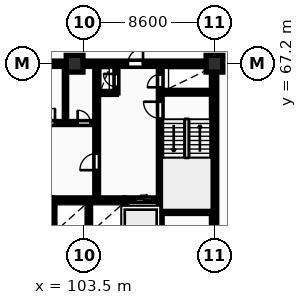
"""IFC4 building model, lengths in metres.
Left out: names, types, materials, properties, quantities, classifications, styles, units other than length and angle.
Written with IfcOpenShell. Run it as: python <this file> out.ifc"""

import sys

from ifc_helpers import new_model, si_unit, direction, frame, frame_2d, origin, origin_2d, place, context, subcontext, project, spatial, rectangle, extrude, element, fill, save


model = new_model("IFC4")
c1 = context("Model", 3, precision=1e-05, world=origin(), true_north=direction((0.0, 1.0)))
c2 = subcontext(c1, "Body", "Model", "MODEL_VIEW")
j1 = project(units=[si_unit("LENGTHUNIT", "METRE"), si_unit("PLANEANGLEUNIT", "RADIAN")], contexts=[c1])
p1 = place(None, origin())
s1 = spatial("IfcSite", under=j1, at=p1, CompositionType="ELEMENT")
p2 = place(p1, origin())
s2 = spatial("IfcBuilding", under=s1, at=p2, CompositionType="ELEMENT")
p3 = place(p2, frame((0.0, 0.0, -7.2)))
s3 = spatial("IfcBuildingStorey", under=s2, at=p3, CompositionType="ELEMENT", Elevation=-7.2)
for number, where, z_axis, x_axis in (
    (1, (102.9, 67.2, 0.0), (0.0, 0.0, 1.0), (1.0, 0.0, 0.0)),
    (2, (112.1, 67.2, 0.0), (0.0, 0.0, 1.0), (1.0, 0.0, 0.0)),
):
    element("IfcColumn", number, at=place(p3, frame(where, z_axis=z_axis, x_axis=x_axis)), inside=s3, PredefinedType="COLUMN", context=c2, shape_type="SweptSolid", body=[
        extrude(rectangle(XDim=1.1, YDim=1.1, at=origin_2d()), origin(), (0.0, 0.0, 1.0), 3.6),
    ])
p4 = place(p3, frame((112.075, 55.375, 0.0), z_axis=(0.0, 0.0, 1.0), x_axis=(0.0, 1.0, 0.0)))
e3 = element("IfcWall", 3, at=p4, inside=s3, PredefinedType="SHEAR", context=c2, shape_type="SweptSolid", body=[
    extrude(rectangle(XDim=11.65, YDim=0.35, at=frame_2d((5.825, 0.0))), origin(), (0.0, 0.0, 1.0), 3.6),
])
p5 = place(p3, frame((75.95, 67.2, 0.0), z_axis=(0.0, 0.0, 1.0), x_axis=(1.0, 0.0, 0.0)))
e4 = element("IfcWall", 4, at=p5, inside=s3, PredefinedType="SHEAR", context=c2, shape_type="SweptSolid", body=[
    extrude(rectangle(XDim=36.3, YDim=0.35, at=frame_2d((18.15, 0.0))), origin(), (0.0, 0.0, 1.0), 3.6),
])
p6 = place(p5, frame((5.25, 0.0, 0.0)))
e5 = element("IfcOpeningElement", 5, at=p6, cuts=e4, PredefinedType="OPENING", context=c2, shape_type="SweptSolid", body=[
    extrude(rectangle(XDim=1.0, YDim=2.15, at=frame_2d((0.5, 1.075))), frame((0.0, 0.185, 0.0), z_axis=(0.0, -1.0, 0.0), x_axis=(1.0, 0.0, 0.0)), (0.0, 0.0, 1.0), 0.37),
])
p7 = place(p5, frame((21.6, 0.0, 0.0)))
e6 = element("IfcOpeningElement", 6, at=p7, cuts=e4, PredefinedType="OPENING", context=c2, shape_type="SweptSolid", body=[
    extrude(rectangle(XDim=1.5, YDim=2.2, at=frame_2d((0.75, 1.1))), frame((0.0, 0.185, 0.0), z_axis=(0.0, -1.0, 0.0), x_axis=(1.0, 0.0, 0.0)), (0.0, 0.0, 1.0), 0.37),
])
p8 = place(p5, frame((30.45, 0.0, 0.0)))
e7 = element("IfcOpeningElement", 7, at=p8, cuts=e4, PredefinedType="OPENING", context=c2, shape_type="SweptSolid", body=[
    extrude(rectangle(XDim=1.0, YDim=2.15, at=frame_2d((0.5, 1.075))), frame((0.0, 0.185, 0.0), z_axis=(0.0, -1.0, 0.0), x_axis=(1.0, 0.0, 0.0)), (0.0, 0.0, 1.0), 0.37),
])
p9 = place(p3, frame((101.48, 55.4, 0.0), z_axis=(0.0, 0.0, 1.0), x_axis=(0.0, 1.0, 0.0)))
e8 = element("IfcWall", 8, at=p9, inside=s3, PredefinedType="SHEAR", context=c2, shape_type="SweptSolid", body=[
    extrude(rectangle(XDim=2.85, YDim=0.25, at=frame_2d((1.425, 0.0))), origin(), (0.0, 0.0, 1.0), 3.6),
])
p10 = place(p3, frame((103.85, 55.4, 0.0), z_axis=(0.0, 0.0, 1.0), x_axis=(0.0, 1.0, 0.0)))
e9 = element("IfcWall", 9, at=p10, inside=s3, PredefinedType="PARTITIONING", context=c2, shape_type="SweptSolid", body=[
    extrude(rectangle(XDim=2.72, YDim=0.2, at=frame_2d((1.36, 0.0))), origin(), (0.0, 0.0, 1.0), 3.3),
])
p11 = place(p3, frame((101.55, 58.25, 0.0), z_axis=(0.0, 0.0, 1.0), x_axis=(1.0, 0.0, 0.0)))
e10 = element("IfcWall", 10, at=p11, inside=s3, PredefinedType="SHEAR", context=c2, shape_type="SweptSolid", body=[
    extrude(rectangle(XDim=4.6, YDim=0.25, at=frame_2d((2.3, 0.0))), origin(), (0.0, 0.0, 1.0), 3.6),
])
p12 = place(p3, frame((106.22, 55.4, 0.0), z_axis=(0.0, 0.0, 1.0), x_axis=(0.0, 1.0, 0.0)))
e11 = element("IfcWall", 11, at=p12, inside=s3, PredefinedType="SHEAR", context=c2, shape_type="SweptSolid", body=[
    extrude(rectangle(XDim=2.85, YDim=0.25, at=frame_2d((1.425, 0.0))), origin(), (0.0, 0.0, 1.0), 3.6),
])
p13 = place(p3, frame((106.22, 58.25, 0.0), z_axis=(0.0, 0.0, 1.0), x_axis=(1.0, 0.0, 0.0)))
e12 = element("IfcWall", 12, at=p13, inside=s3, PredefinedType="SHEAR", context=c2, shape_type="SweptSolid", body=[
    extrude(rectangle(XDim=2.46, YDim=0.25, at=frame_2d((1.23, 0.0))), origin(), (0.0, 0.0, 1.0), 3.6),
])
p14 = place(p13, frame((0.67, 0.0, 0.0)))
e13 = element("IfcOpeningElement", 13, at=p14, cuts=e12, PredefinedType="OPENING", context=c2, shape_type="SweptSolid", body=[
    extrude(rectangle(XDim=1.12, YDim=2.12, at=frame_2d((0.56, 1.06))), frame((0.0, 0.135, 0.0), z_axis=(0.0, -1.0, 0.0), x_axis=(1.0, 0.0, 0.0)), (0.0, 0.0, 1.0), 0.27),
])
p15 = place(p3, frame((102.3, 63.4, 0.0), z_axis=(0.0, 0.0, 1.0), x_axis=(0.0, 1.0, 0.0)))
e14 = element("IfcWall", 14, at=p15, inside=s3, PredefinedType="PARTITIONING", context=c2, shape_type="SweptSolid", body=[
    extrude(rectangle(XDim=3.6, YDim=0.15, at=frame_2d((1.8, 0.0))), origin(), (0.0, 0.0, 1.0), 3.3),
])
p16 = place(p3, frame((84.42, 63.3, 0.0), z_axis=(0.0, 0.0, 1.0), x_axis=(1.0, 0.0, 0.0)))
e15 = element("IfcWall", 15, at=p16, inside=s3, PredefinedType="PARTITIONING", context=c2, shape_type="SweptSolid", body=[
    extrude(rectangle(XDim=19.83, YDim=0.2, at=frame_2d((9.915, 0.0))), origin(), (0.0, 0.0, 1.0), 3.3),
])
p17 = place(p16, frame((1.15, 0.0, 0.0)))
e16 = element("IfcOpeningElement", 16, at=p17, cuts=e15, PredefinedType="OPENING", context=c2, shape_type="SweptSolid", body=[
    extrude(rectangle(XDim=0.85, YDim=2.05, at=frame_2d((0.425, 1.025))), frame((0.0, 0.11, 0.0), z_axis=(0.0, -1.0, 0.0), x_axis=(1.0, 0.0, 0.0)), (0.0, 0.0, 1.0), 0.22),
])
p18 = place(p16, frame((3.25, 0.0, 0.0)))
e17 = element("IfcOpeningElement", 17, at=p18, cuts=e15, PredefinedType="OPENING", context=c2, shape_type="SweptSolid", body=[
    extrude(rectangle(XDim=0.85, YDim=2.05, at=frame_2d((0.425, 1.025))), frame((0.0, 0.11, 0.0), z_axis=(0.0, -1.0, 0.0), x_axis=(1.0, 0.0, 0.0)), (0.0, 0.0, 1.0), 0.22),
])
p19 = place(p16, frame((13.08, 0.0, 0.0)))
e18 = element("IfcOpeningElement", 18, at=p19, cuts=e15, PredefinedType="OPENING", context=c2, shape_type="SweptSolid", body=[
    extrude(rectangle(XDim=1.5, YDim=2.2, at=frame_2d((0.75, 1.1))), frame((0.0, 0.11, 0.0), z_axis=(0.0, -1.0, 0.0), x_axis=(1.0, 0.0, 0.0)), (0.0, 0.0, 1.0), 0.22),
])
p20 = place(p16, frame((5.53, 0.0, 0.0)))
e19 = element("IfcOpeningElement", 19, at=p20, cuts=e15, PredefinedType="OPENING", context=c2, shape_type="SweptSolid", body=[
    extrude(rectangle(XDim=0.88, YDim=2.06, at=frame_2d((0.44, 1.03))), frame((0.0, 0.11, 0.0), z_axis=(0.0, -1.0, 0.0), x_axis=(1.0, 0.0, 0.0)), (0.0, 0.0, 1.0), 0.22),
])
p21 = place(p16, frame((7.68, 0.0, 0.0)))
e20 = element("IfcOpeningElement", 20, at=p21, cuts=e15, PredefinedType="OPENING", context=c2, shape_type="SweptSolid", body=[
    extrude(rectangle(XDim=0.88, YDim=2.06, at=frame_2d((0.44, 1.03))), frame((0.0, 0.11, 0.0), z_axis=(0.0, -1.0, 0.0), x_axis=(1.0, 0.0, 0.0)), (0.0, 0.0, 1.0), 0.22),
])
p22 = place(p16, frame((10.43, 0.0, 0.0)))
e21 = element("IfcOpeningElement", 21, at=p22, cuts=e15, PredefinedType="OPENING", context=c2, shape_type="SweptSolid", body=[
    extrude(rectangle(XDim=0.85, YDim=2.05, at=frame_2d((0.425, 1.025))), frame((0.0, 0.11, 0.0), z_axis=(0.0, -1.0, 0.0), x_axis=(1.0, 0.0, 0.0)), (0.0, 0.0, 1.0), 0.22),
])
p23 = place(p16, frame((16.23, 0.0, 0.0)))
e22 = element("IfcOpeningElement", 22, at=p23, cuts=e15, PredefinedType="OPENING", context=c2, shape_type="SweptSolid", body=[
    extrude(rectangle(XDim=0.96, YDim=2.1, at=frame_2d((0.48, 1.05))), frame((0.0, 0.11, 0.0), z_axis=(0.0, -1.0, 0.0), x_axis=(1.0, 0.0, 0.0)), (0.0, 0.0, 1.0), 0.22),
])
p24 = place(p16, frame((18.68, 0.0, 0.0)))
e23 = element("IfcOpeningElement", 23, at=p24, cuts=e15, PredefinedType="OPENING", context=c2, shape_type="SweptSolid", body=[
    extrude(rectangle(XDim=0.84, YDim=2.04, at=frame_2d((0.42, 1.02))), frame((0.0, 0.11, 0.0), z_axis=(0.0, -1.0, 0.0), x_axis=(1.0, 0.0, 0.0)), (0.0, 0.0, 1.0), 0.22),
])
p25 = place(p3, frame((104.45, 65.28, 0.0), z_axis=(0.0, 0.0, 1.0), x_axis=(1.0, 0.0, 0.0)))
e24 = element("IfcWall", 24, at=p25, inside=s3, PredefinedType="PARTITIONING", context=c2, shape_type="SweptSolid", body=[
    extrude(rectangle(XDim=1.2, YDim=0.2, at=frame_2d((0.6, 0.0))), origin(), (0.0, 0.0, 1.0), 3.3),
])
p26 = place(p3, frame((105.65, 65.28, 0.0), z_axis=(0.0, 0.0, 1.0), x_axis=(0.0, 1.0, 0.0)))
e25 = element("IfcWall", 25, at=p26, inside=s3, PredefinedType="PARTITIONING", context=c2, shape_type="SweptSolid", body=[
    extrude(rectangle(XDim=1.72, YDim=0.2, at=frame_2d((0.86, 0.0))), origin(), (0.0, 0.0, 1.0), 3.3),
])
p27 = place(p26, frame((0.4, 0.0, 0.0)))
e26 = element("IfcOpeningElement", 26, at=p27, cuts=e25, PredefinedType="OPENING", context=c2, shape_type="SweptSolid", body=[
    extrude(rectangle(XDim=0.85, YDim=2.05, at=frame_2d((0.425, 1.025))), frame((0.0, 0.11, 0.0), z_axis=(0.0, -1.0, 0.0), x_axis=(1.0, 0.0, 0.0)), (0.0, 0.0, 1.0), 0.22),
])
p28 = place(p3, frame((104.35, 58.4, 0.0), z_axis=(0.0, 0.0, 1.0), x_axis=(0.0, 1.0, 0.0)))
e27 = element("IfcWall", 27, at=p28, inside=s3, PredefinedType="SHEAR", context=c2, shape_type="SweptSolid", body=[
    extrude(rectangle(XDim=8.6, YDim=0.25, at=frame_2d((4.3, 0.0))), origin(), (0.0, 0.0, 1.0), 3.6),
])
p29 = place(p28, frame((1.8, 0.0, 0.0)))
e28 = element("IfcOpeningElement", 28, at=p29, cuts=e27, PredefinedType="OPENING", context=c2, shape_type="SweptSolid", body=[
    extrude(rectangle(XDim=1.1, YDim=2.1, at=frame_2d((0.55, 1.05))), frame((0.0, 0.135, 0.0), z_axis=(0.0, -1.0, 0.0), x_axis=(1.0, 0.0, 0.0)), (0.0, 0.0, 1.0), 0.27),
])
p30 = place(p3, frame((108.535, 55.4, 0.0), z_axis=(0.0, 0.0, 1.0), x_axis=(0.0, 1.0, 0.0)))
e29 = element("IfcWall", 29, at=p30, inside=s3, PredefinedType="SHEAR", context=c2, shape_type="SweptSolid", body=[
    extrude(rectangle(XDim=11.6, YDim=0.25, at=frame_2d((5.8, 0.0))), origin(), (0.0, 0.0, 1.0), 3.6),
])
p31 = place(p30, frame((8.2, 0.0, 0.0)))
e30 = element("IfcOpeningElement", 30, at=p31, cuts=e29, PredefinedType="OPENING", context=c2, shape_type="SweptSolid", body=[
    extrude(rectangle(XDim=1.1, YDim=2.1, at=frame_2d((0.55, 1.05))), frame((0.0, 0.135, 0.0), z_axis=(0.0, -1.0, 0.0), x_axis=(1.0, 0.0, 0.0)), (0.0, 0.0, 1.0), 0.27),
])
p32 = place(p30, frame((10.25, 0.0, 0.0)))
e31 = element("IfcOpeningElement", 31, at=p32, cuts=e29, PredefinedType="OPENING", context=c2, shape_type="SweptSolid", body=[
    extrude(rectangle(XDim=0.85, YDim=2.05, at=frame_2d((0.425, 1.025))), frame((0.0, 0.135, 0.0), z_axis=(0.0, -1.0, 0.0), x_axis=(1.0, 0.0, 0.0)), (0.0, 0.0, 1.0), 0.27),
])
for number, where, z_axis, x_axis in (
    (32, (108.66, 57.475, 0.0), (0.0, 0.0, 1.0), (1.0, 0.0, 0.0)),
    (33, (108.66, 65.325, 0.0), (0.0, 0.0, 1.0), (1.0, 0.0, 0.0)),
):
    element("IfcWall", number, at=place(p3, frame(where, z_axis=z_axis, x_axis=x_axis)), inside=s3, PredefinedType="SHEAR", context=c2, shape_type="SweptSolid", body=[
        extrude(rectangle(XDim=3.24, YDim=0.25, at=frame_2d((1.62, 0.0))), origin(), (0.0, 0.0, 1.0), 3.6),
    ])
p33 = place(p8, origin())
e34 = element("IfcDoor", 34, at=p33, inside=s3, OperationType="SINGLE_SWING_RIGHT", PredefinedType="DOOR", context=c2, shape_type="SweptSolid", body=[
    extrude(rectangle(XDim=1.0, YDim=2.15, at=frame_2d((0.5, 1.075))), frame((0.0, 0.025, 0.0), z_axis=(0.0, -1.0, 0.0), x_axis=(1.0, 0.0, 0.0)), (0.0, 0.0, 1.0), 0.05),
])
fill(e7, e34)
p34 = place(p14, origin())
e35 = element("IfcDoor", 35, at=p34, inside=s3, OperationType="SLIDING_TO_RIGHT", PredefinedType="DOOR", context=c2, shape_type="SweptSolid", body=[
    extrude(rectangle(XDim=1.12, YDim=2.12, at=frame_2d((0.56, 1.06))), frame((0.0, 0.025, 0.0), z_axis=(0.0, -1.0, 0.0), x_axis=(1.0, 0.0, 0.0)), (0.0, 0.0, 1.0), 0.05),
])
fill(e13, e35)
p35 = place(p23, origin())
e36 = element("IfcDoor", 36, at=p35, inside=s3, OperationType="SINGLE_SWING_RIGHT", PredefinedType="DOOR", context=c2, shape_type="SweptSolid", body=[
    extrude(rectangle(XDim=0.96, YDim=2.1, at=frame_2d((0.48, 1.05))), frame((0.0, 0.025, 0.0), z_axis=(0.0, -1.0, 0.0), x_axis=(1.0, 0.0, 0.0)), (0.0, 0.0, 1.0), 0.05),
])
fill(e22, e36)
p36 = place(p24, origin())
e37 = element("IfcDoor", 37, at=p36, inside=s3, OperationType="SINGLE_SWING_LEFT", PredefinedType="DOOR", context=c2, shape_type="SweptSolid", body=[
    extrude(rectangle(XDim=0.84, YDim=2.04, at=frame_2d((0.42, 1.02))), frame((0.0, 0.025, 0.0), z_axis=(0.0, -1.0, 0.0), x_axis=(1.0, 0.0, 0.0)), (0.0, 0.0, 1.0), 0.05),
])
fill(e23, e37)
p37 = place(p27, origin())
e38 = element("IfcDoor", 38, at=p37, inside=s3, OperationType="SINGLE_SWING_RIGHT", PredefinedType="DOOR", context=c2, shape_type="SweptSolid", body=[
    extrude(rectangle(XDim=0.85, YDim=2.05, at=frame_2d((0.425, 1.025))), frame((0.0, 0.025, 0.0), z_axis=(0.0, -1.0, 0.0), x_axis=(1.0, 0.0, 0.0)), (0.0, 0.0, 1.0), 0.05),
])
fill(e26, e38)
p38 = place(p29, origin())
e39 = element("IfcDoor", 39, at=p38, inside=s3, OperationType="SINGLE_SWING_LEFT", PredefinedType="DOOR", context=c2, shape_type="SweptSolid", body=[
    extrude(rectangle(XDim=1.1, YDim=2.1, at=frame_2d((0.55, 1.05))), frame((0.0, 0.025, 0.0), z_axis=(0.0, -1.0, 0.0), x_axis=(1.0, 0.0, 0.0)), (0.0, 0.0, 1.0), 0.05),
])
fill(e28, e39)
p39 = place(p31, origin())
e40 = element("IfcDoor", 40, at=p39, inside=s3, OperationType="SINGLE_SWING_RIGHT", PredefinedType="DOOR", context=c2, shape_type="SweptSolid", body=[
    extrude(rectangle(XDim=1.1, YDim=2.1, at=frame_2d((0.55, 1.05))), frame((0.0, 0.025, 0.0), z_axis=(0.0, -1.0, 0.0), x_axis=(1.0, 0.0, 0.0)), (0.0, 0.0, 1.0), 0.05),
])
fill(e30, e40)
p40 = place(p32, origin())
e41 = element("IfcDoor", 41, at=p40, inside=s3, OperationType="SINGLE_SWING_LEFT", PredefinedType="DOOR", context=c2, shape_type="SweptSolid", body=[
    extrude(rectangle(XDim=0.85, YDim=2.05, at=frame_2d((0.425, 1.025))), frame((0.0, 0.025, 0.0), z_axis=(0.0, -1.0, 0.0), x_axis=(1.0, 0.0, 0.0)), (0.0, 0.0, 1.0), 0.05),
])
fill(e31, e41)
save(model, sys.argv[1])
